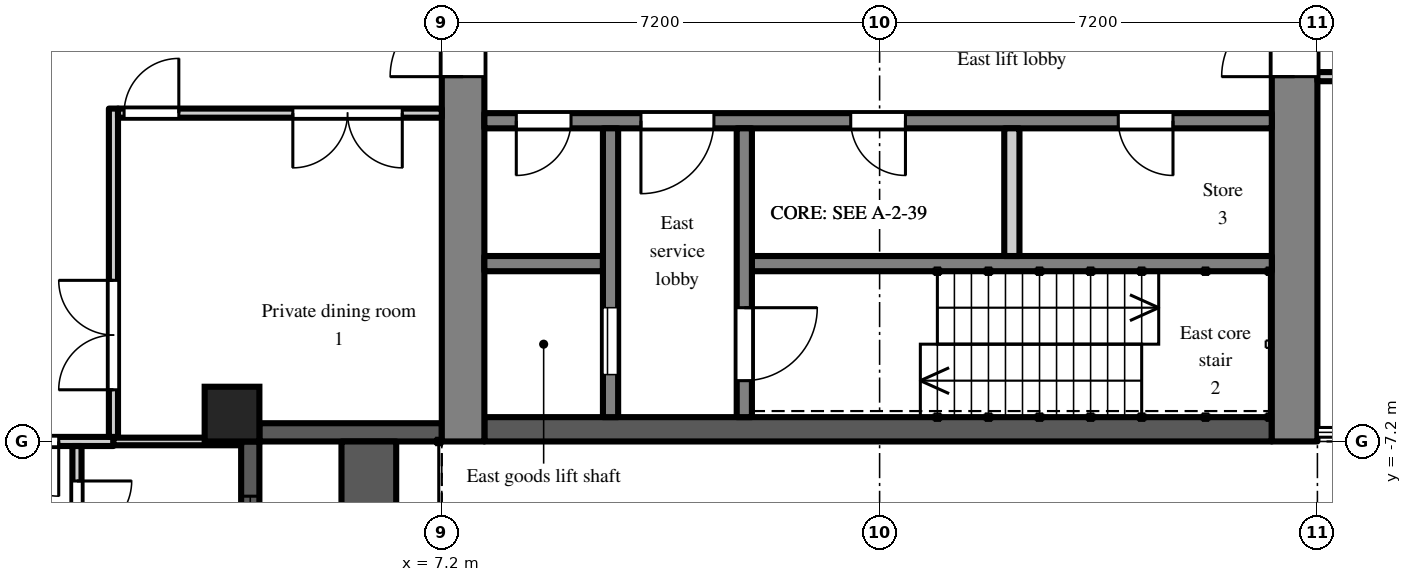
"""IFC4 building model, lengths in metres.
Left out: names, types, materials, properties, quantities, classifications, styles, units other than length and angle.
Written with IfcOpenShell. Run it as: python <this file> out.ifc"""

import sys

from ifc_helpers import new_model, si_unit, direction, frame, frame_2d, origin, origin_2d, place, context, subcontext, project, spatial, rectangle, extrude, element, fill, save


model = new_model("IFC4")
c1 = context("Model", 3, precision=1e-05, world=origin(), true_north=direction((0.0, 1.0)))
c2 = subcontext(c1, "Body", "Model", "MODEL_VIEW")
j1 = project(units=[si_unit("LENGTHUNIT", "METRE"), si_unit("PLANEANGLEUNIT", "RADIAN")], contexts=[c1])
p1 = place(None, origin())
s1 = spatial("IfcSite", under=j1, at=p1, CompositionType="ELEMENT")
p2 = place(p1, origin())
s2 = spatial("IfcBuilding", under=s1, at=p2, CompositionType="ELEMENT")
p3 = place(p2, frame((0.0, 0.0, 237.9)))
s3 = spatial("IfcBuildingStorey", under=s2, at=p3, CompositionType="ELEMENT", Elevation=237.9)
p4 = place(p3, frame((3.75, -6.75, 0.0), z_axis=(0.0, 0.0, 1.0), x_axis=(1.0, 0.0, 0.0)))
e1 = element("IfcColumn", 1, at=p4, inside=s3, PredefinedType="COLUMN", context=c2, shape_type="SweptSolid", body=[
    extrude(rectangle(XDim=0.9, YDim=0.9, at=origin_2d()), origin(), (0.0, 0.0, 1.0), 4.2),
])
p5 = place(p3, frame((4.05, -14.4, 0.0), z_axis=(0.0, 0.0, 1.0), x_axis=(0.0, 1.0, 0.0)))
e2 = element("IfcWall", 2, at=p5, inside=s3, PredefinedType="SOLIDWALL", context=c2, shape_type="SweptSolid", body=[
    extrude(rectangle(XDim=7.2, YDim=0.3, at=frame_2d((3.6, 0.0))), origin(), (0.0, 0.0, 1.0), 3.75),
])
p6 = place(p5, frame((3.0, 0.0, 0.0)))
e3 = element("IfcOpeningElement", 3, at=p6, cuts=e2, PredefinedType="OPENING", context=c2, shape_type="SweptSolid", body=[
    extrude(rectangle(XDim=1.2, YDim=2.05, at=frame_2d((0.6, 1.025))), frame((0.0, 0.16, 0.0), z_axis=(0.0, -1.0, 0.0), x_axis=(1.0, 0.0, 0.0)), (0.0, 0.0, 1.0), 0.32),
])
p7 = place(p5, frame((0.9, 0.0, 0.2)))
e4 = element("IfcOpeningElement", 4, at=p7, cuts=e2, PredefinedType="OPENING", context=c2, shape_type="SweptSolid", body=[
    extrude(rectangle(XDim=1.8, YDim=1.85, at=frame_2d((0.9, 0.925))), frame((0.0, 0.16, 0.0), z_axis=(0.0, -1.0, 0.0), x_axis=(1.0, 0.0, 0.0)), (0.0, 0.0, 1.0), 0.32),
])
p8 = place(p5, frame((4.5, 0.0, 0.2)))
e5 = element("IfcOpeningElement", 5, at=p8, cuts=e2, PredefinedType="OPENING", context=c2, shape_type="SweptSolid", body=[
    extrude(rectangle(XDim=1.8, YDim=1.85, at=frame_2d((0.9, 0.925))), frame((0.0, 0.16, 0.0), z_axis=(0.0, -1.0, 0.0), x_axis=(1.0, 0.0, 0.0)), (0.0, 0.0, 1.0), 0.32),
])
p9 = place(p3, frame((4.2, -7.05, 0.0), z_axis=(0.0, 0.0, 1.0), x_axis=(1.0, 0.0, 0.0)))
e6 = element("IfcWall", 6, at=p9, inside=s3, PredefinedType="SOLIDWALL", context=c2, shape_type="SweptSolid", body=[
    extrude(rectangle(XDim=3.0, YDim=0.3, at=frame_2d((1.5, 0.0))), origin(), (0.0, 0.0, 1.0), 3.75),
])
p10 = place(p3, frame((6.0, -14.4, 0.0), z_axis=(0.0, 0.0, 1.0), x_axis=(0.0, 1.0, 0.0)))
e7 = element("IfcWall", 7, at=p10, inside=s3, PredefinedType="PARAPET", context=c2, shape_type="SweptSolid", body=[
    extrude(rectangle(XDim=7.2, YDim=0.9, at=frame_2d((3.6, 0.0))), origin(), (0.0, 0.0, 1.0), 0.8),
])
p11 = place(p3, frame((7.55, -7.2, 0.0), z_axis=(0.0, 0.0, 1.0), x_axis=(0.0, 1.0, 0.0)))
e8 = element("IfcWall", 8, at=p11, inside=s3, PredefinedType="SHEAR", context=c2, shape_type="SweptSolid", body=[
    extrude(rectangle(XDim=14.4, YDim=0.7, at=frame_2d((7.2, 0.0))), origin(), (0.0, 0.0, 1.0), 3.75),
])
p12 = place(p11, frame((6.0, 0.0, 0.0)))
e9 = element("IfcOpeningElement", 9, at=p12, cuts=e8, PredefinedType="OPENING", context=c2, shape_type="SweptSolid", body=[
    extrude(rectangle(XDim=2.4, YDim=2.2, at=frame_2d((1.2, 1.1))), frame((0.0, 0.36, 0.0), z_axis=(0.0, -1.0, 0.0), x_axis=(1.0, 0.0, 0.0)), (0.0, 0.0, 1.0), 0.72),
])
p13 = place(p3, frame((21.225, -7.2, 0.0), z_axis=(0.0, 0.0, 1.0), x_axis=(0.0, 1.0, 0.0)))
e10 = element("IfcWall", 10, at=p13, inside=s3, PredefinedType="SHEAR", context=c2, shape_type="SweptSolid", body=[
    extrude(rectangle(XDim=14.4, YDim=0.75, at=frame_2d((7.2, 0.0))), origin(), (0.0, 0.0, 1.0), 3.75),
])
p14 = place(p13, frame((6.0, 0.0, 0.0)))
e11 = element("IfcOpeningElement", 11, at=p14, cuts=e10, PredefinedType="OPENING", context=c2, shape_type="SweptSolid", body=[
    extrude(rectangle(XDim=2.4, YDim=2.2, at=frame_2d((1.2, 1.1))), frame((0.0, 0.385, 0.0), z_axis=(0.0, -1.0, 0.0), x_axis=(1.0, 0.0, 0.0)), (0.0, 0.0, 1.0), 0.77),
])
p15 = place(p3, frame((7.9, -7.0, 0.0), z_axis=(0.0, 0.0, 1.0), x_axis=(1.0, 0.0, 0.0)))
e12 = element("IfcWall", 12, at=p15, inside=s3, PredefinedType="SHEAR", context=c2, shape_type="SweptSolid", body=[
    extrude(rectangle(XDim=12.95, YDim=0.4, at=frame_2d((6.475, 0.0))), origin(), (0.0, 0.0, 1.0), 3.75),
])
p16 = place(p3, frame((7.9, -1.925, 0.0), z_axis=(0.0, 0.0, 1.0), x_axis=(1.0, 0.0, 0.0)))
e13 = element("IfcWall", 13, at=p16, inside=s3, PredefinedType="SHEAR", context=c2, shape_type="SweptSolid", body=[
    extrude(rectangle(XDim=12.95, YDim=0.25, at=frame_2d((6.475, 0.0))), origin(), (0.0, 0.0, 1.0), 3.75),
])
p17 = place(p16, frame((0.525, 0.0, 0.0)))
e14 = element("IfcOpeningElement", 14, at=p17, cuts=e13, PredefinedType="OPENING", context=c2, shape_type="SweptSolid", body=[
    extrude(rectangle(XDim=0.9, YDim=2.1, at=frame_2d((0.45, 1.05))), frame((0.0, 0.135, 0.0), z_axis=(0.0, -1.0, 0.0), x_axis=(1.0, 0.0, 0.0)), (0.0, 0.0, 1.0), 0.27),
])
p18 = place(p16, frame((2.575, 0.0, 0.0)))
e15 = element("IfcOpeningElement", 15, at=p18, cuts=e13, PredefinedType="OPENING", context=c2, shape_type="SweptSolid", body=[
    extrude(rectangle(XDim=1.2, YDim=2.1, at=frame_2d((0.6, 1.05))), frame((0.0, 0.135, 0.0), z_axis=(0.0, -1.0, 0.0), x_axis=(1.0, 0.0, 0.0)), (0.0, 0.0, 1.0), 0.27),
])
p19 = place(p16, frame((6.025, 0.0, 0.0)))
e16 = element("IfcOpeningElement", 16, at=p19, cuts=e13, PredefinedType="OPENING", context=c2, shape_type="SweptSolid", body=[
    extrude(rectangle(XDim=0.9, YDim=2.1, at=frame_2d((0.45, 1.05))), frame((0.0, 0.135, 0.0), z_axis=(0.0, -1.0, 0.0), x_axis=(1.0, 0.0, 0.0)), (0.0, 0.0, 1.0), 0.27),
])
p20 = place(p16, frame((10.425, 0.0, 0.0)))
e17 = element("IfcOpeningElement", 17, at=p20, cuts=e13, PredefinedType="OPENING", context=c2, shape_type="SweptSolid", body=[
    extrude(rectangle(XDim=0.9, YDim=2.1, at=frame_2d((0.45, 1.05))), frame((0.0, 0.135, 0.0), z_axis=(0.0, -1.0, 0.0), x_axis=(1.0, 0.0, 0.0)), (0.0, 0.0, 1.0), 0.27),
])
p21 = place(p3, frame((7.9, -4.275, 0.0), z_axis=(0.0, 0.0, 1.0), x_axis=(1.0, 0.0, 0.0)))
e18 = element("IfcWall", 18, at=p21, inside=s3, PredefinedType="SHEAR", context=c2, shape_type="SweptSolid", body=[
    extrude(rectangle(XDim=1.95, YDim=0.25, at=frame_2d((0.975, 0.0))), origin(), (0.0, 0.0, 1.0), 3.75),
])
p22 = place(p3, frame((12.3, -4.275, 0.0), z_axis=(0.0, 0.0, 1.0), x_axis=(1.0, 0.0, 0.0)))
e19 = element("IfcWall", 19, at=p22, inside=s3, PredefinedType="SHEAR", context=c2, shape_type="SweptSolid", body=[
    extrude(rectangle(XDim=8.55, YDim=0.25, at=frame_2d((4.275, 0.0))), origin(), (0.0, 0.0, 1.0), 3.75),
])
p23 = place(p3, frame((9.975, -2.05, 0.0), z_axis=(0.0, 0.0, 1.0), x_axis=(0.0, -1.0, 0.0)))
e20 = element("IfcWall", 20, at=p23, inside=s3, PredefinedType="SHEAR", context=c2, shape_type="SweptSolid", body=[
    extrude(rectangle(XDim=4.75, YDim=0.25, at=frame_2d((2.375, 0.0))), origin(), (0.0, 0.0, 1.0), 3.75),
])
p24 = place(p23, frame((2.95, 0.0, 0.0)))
e21 = element("IfcOpeningElement", 21, at=p24, cuts=e20, PredefinedType="OPENING", context=c2, shape_type="SweptSolid", body=[
    extrude(rectangle(XDim=1.1, YDim=2.1, at=frame_2d((0.55, 1.05))), frame((0.0, 0.135, 0.0), z_axis=(0.0, -1.0, 0.0), x_axis=(1.0, 0.0, 0.0)), (0.0, 0.0, 1.0), 0.27),
])
p25 = place(p3, frame((12.175, -2.05, 0.0), z_axis=(0.0, 0.0, 1.0), x_axis=(0.0, -1.0, 0.0)))
e22 = element("IfcWall", 22, at=p25, inside=s3, PredefinedType="SHEAR", context=c2, shape_type="SweptSolid", body=[
    extrude(rectangle(XDim=4.75, YDim=0.25, at=frame_2d((2.375, 0.0))), origin(), (0.0, 0.0, 1.0), 3.75),
])
p26 = place(p25, frame((2.95, 0.0, 0.0)))
e23 = element("IfcOpeningElement", 23, at=p26, cuts=e22, PredefinedType="OPENING", context=c2, shape_type="SweptSolid", body=[
    extrude(rectangle(XDim=1.2, YDim=2.1, at=frame_2d((0.6, 1.05))), frame((0.0, 0.135, 0.0), z_axis=(0.0, -1.0, 0.0), x_axis=(1.0, 0.0, 0.0)), (0.0, 0.0, 1.0), 0.27),
])
p27 = place(p3, frame((16.575, -2.05, 0.0), z_axis=(0.0, 0.0, 1.0), x_axis=(0.0, -1.0, 0.0)))
e24 = element("IfcWall", 24, at=p27, inside=s3, PredefinedType="PARTITIONING", context=c2, shape_type="SweptSolid", body=[
    extrude(rectangle(XDim=2.1, YDim=0.25, at=frame_2d((1.05, 0.0))), origin(), (0.0, 0.0, 1.0), 3.75),
])
p28 = place(p3, frame((-3.9, -7.2, 0.0), z_axis=(0.0, 0.0, 1.0), x_axis=(1.0, 0.0, 0.0)))
e25 = element("IfcWall", 25, at=p28, inside=s3, PredefinedType="PARTITIONING", context=c2, shape_type="SweptSolid", body=[
    extrude(rectangle(XDim=5.7, YDim=0.15, at=frame_2d((2.85, 0.0))), origin(), (0.0, 0.0, 1.0), 3.75),
])
p29 = place(p28, frame((3.0, 0.0, 0.0)))
e26 = element("IfcOpeningElement", 26, at=p29, cuts=e25, PredefinedType="OPENING", context=c2, shape_type="SweptSolid", body=[
    extrude(rectangle(XDim=1.8, YDim=2.1, at=frame_2d((0.9, 1.05))), frame((0.0, 0.085, 0.0), z_axis=(0.0, -1.0, 0.0), x_axis=(1.0, 0.0, 0.0)), (0.0, 0.0, 1.0), 0.17),
])
p30 = place(p3, frame((1.2, -21.42, 0.0), z_axis=(0.0, 0.0, 1.0), x_axis=(0.0, 1.0, 0.0)))
e27 = element("IfcWall", 27, at=p30, inside=s3, PredefinedType="PARTITIONING", context=c2, shape_type="SweptSolid", body=[
    extrude(rectangle(XDim=14.145, YDim=0.15, at=frame_2d((7.073, 0.0))), origin(), (0.0, 0.0, 1.0), 3.75),
])
p31 = place(p30, frame((0.97, 0.0, 0.0)))
e28 = element("IfcOpeningElement", 28, at=p31, cuts=e27, PredefinedType="OPENING", context=c2, shape_type="SweptSolid", body=[
    extrude(rectangle(XDim=0.9, YDim=2.1, at=frame_2d((0.45, 1.05))), frame((0.0, 0.085, 0.0), z_axis=(0.0, -1.0, 0.0), x_axis=(1.0, 0.0, 0.0)), (0.0, 0.0, 1.0), 0.17),
])
p32 = place(p30, frame((2.77, 0.0, 0.0)))
e29 = element("IfcOpeningElement", 29, at=p32, cuts=e27, PredefinedType="OPENING", context=c2, shape_type="SweptSolid", body=[
    extrude(rectangle(XDim=0.9, YDim=2.1, at=frame_2d((0.45, 1.05))), frame((0.0, 0.085, 0.0), z_axis=(0.0, -1.0, 0.0), x_axis=(1.0, 0.0, 0.0)), (0.0, 0.0, 1.0), 0.17),
])
p33 = place(p30, frame((6.67, 0.0, 0.0)))
e30 = element("IfcOpeningElement", 30, at=p33, cuts=e27, PredefinedType="OPENING", context=c2, shape_type="SweptSolid", body=[
    extrude(rectangle(XDim=1.0, YDim=2.1, at=frame_2d((0.5, 1.05))), frame((0.0, 0.085, 0.0), z_axis=(0.0, -1.0, 0.0), x_axis=(1.0, 0.0, 0.0)), (0.0, 0.0, 1.0), 0.17),
])
p34 = place(p30, frame((12.67, 0.0, 0.0)))
e31 = element("IfcOpeningElement", 31, at=p34, cuts=e27, PredefinedType="OPENING", context=c2, shape_type="SweptSolid", body=[
    extrude(rectangle(XDim=0.9, YDim=2.1, at=frame_2d((0.45, 1.05))), frame((0.0, 0.085, 0.0), z_axis=(0.0, -1.0, 0.0), x_axis=(1.0, 0.0, 0.0)), (0.0, 0.0, 1.0), 0.17),
])
p35 = place(p3, frame((1.8, -7.125, 0.0), z_axis=(0.0, 0.0, 1.0), x_axis=(0.0, 1.0, 0.0)))
e32 = element("IfcWall", 32, at=p35, inside=s3, PredefinedType="PARTITIONING", context=c2, shape_type="SweptSolid", body=[
    extrude(rectangle(XDim=5.4, YDim=0.15, at=frame_2d((2.7, 0.0))), origin(), (0.0, 0.0, 1.0), 3.75),
])
p36 = place(p35, frame((0.775, 0.0, 0.0)))
e33 = element("IfcOpeningElement", 33, at=p36, cuts=e32, PredefinedType="OPENING", context=c2, shape_type="SweptSolid", body=[
    extrude(rectangle(XDim=1.8, YDim=2.1, at=frame_2d((0.9, 1.05))), frame((0.0, 0.085, 0.0), z_axis=(0.0, -1.0, 0.0), x_axis=(1.0, 0.0, 0.0)), (0.0, 0.0, 1.0), 0.17),
])
p37 = place(p3, frame((1.8, -7.2, 0.0), z_axis=(0.0, 0.0, 1.0), x_axis=(1.0, 0.0, 0.0)))
e34 = element("IfcWall", 34, at=p37, inside=s3, PredefinedType="PARTITIONING", context=c2, shape_type="SweptSolid", body=[
    extrude(rectangle(XDim=2.1, YDim=0.125, at=frame_2d((1.05, 0.0))), origin(), (0.0, 0.0, 1.0), 3.75),
])
p38 = place(p3, frame((1.875, -1.8, 0.0), z_axis=(0.0, 0.0, 1.0), x_axis=(1.0, 0.0, 0.0)))
e35 = element("IfcWall", 35, at=p38, inside=s3, PredefinedType="PARTITIONING", context=c2, shape_type="SweptSolid", body=[
    extrude(rectangle(XDim=5.325, YDim=0.15, at=frame_2d((2.663, 0.0))), origin(), (0.0, 0.0, 1.0), 3.75),
])
p39 = place(p38, frame((0.1, 0.0, 0.0)))
e36 = element("IfcOpeningElement", 36, at=p39, cuts=e35, PredefinedType="OPENING", context=c2, shape_type="SweptSolid", body=[
    extrude(rectangle(XDim=0.9, YDim=2.1, at=frame_2d((0.45, 1.05))), frame((0.0, 0.085, 0.0), z_axis=(0.0, -1.0, 0.0), x_axis=(1.0, 0.0, 0.0)), (0.0, 0.0, 1.0), 0.17),
])
p40 = place(p38, frame((2.875, 0.0, 0.0)))
e37 = element("IfcOpeningElement", 37, at=p40, cuts=e35, PredefinedType="OPENING", context=c2, shape_type="SweptSolid", body=[
    extrude(rectangle(XDim=1.8, YDim=2.1, at=frame_2d((0.9, 1.05))), frame((0.0, 0.085, 0.0), z_axis=(0.0, -1.0, 0.0), x_axis=(1.0, 0.0, 0.0)), (0.0, 0.0, 1.0), 0.17),
])
p41 = place(p3, frame((21.6, -1.2, 0.0), z_axis=(0.0, 0.0, 1.0), x_axis=(1.0, 0.0, 0.0)))
e38 = element("IfcWall", 38, at=p41, inside=s3, PredefinedType="PARTITIONING", context=c2, shape_type="SweptSolid", body=[
    extrude(rectangle(XDim=3.525, YDim=0.15, at=frame_2d((1.762, 0.0))), origin(), (0.0, 0.0, 1.0), 3.75),
])
p42 = place(p41, frame((1.35, 0.0, 0.0)))
e39 = element("IfcOpeningElement", 39, at=p42, cuts=e38, PredefinedType="OPENING", context=c2, shape_type="SweptSolid", body=[
    extrude(rectangle(XDim=0.9, YDim=2.1, at=frame_2d((0.45, 1.05))), frame((0.0, 0.085, 0.0), z_axis=(0.0, -1.0, 0.0), x_axis=(1.0, 0.0, 0.0)), (0.0, 0.0, 1.0), 0.17),
])
p43 = place(p8, origin())
e40 = element("IfcWindow", 40, at=p43, inside=s3, PartitioningType="SINGLE_PANEL", PredefinedType="WINDOW", context=c2, shape_type="SweptSolid", body=[
    extrude(rectangle(XDim=1.8, YDim=1.85, at=frame_2d((0.9, 0.925))), frame((0.0, 0.03, 0.0), z_axis=(0.0, -1.0, 0.0), x_axis=(1.0, 0.0, 0.0)), (0.0, 0.0, 1.0), 0.06),
])
fill(e5, e40)
p44 = place(p24, origin())
e41 = element("IfcDoor", 41, at=p44, inside=s3, OperationType="SLIDING_TO_LEFT", PredefinedType="DOOR", context=c2, shape_type="SweptSolid", body=[
    extrude(rectangle(XDim=1.1, YDim=2.1, at=frame_2d((0.55, 1.05))), frame((0.0, 0.025, 0.0), z_axis=(0.0, -1.0, 0.0), x_axis=(1.0, 0.0, 0.0)), (0.0, 0.0, 1.0), 0.05),
])
fill(e21, e41)
p45 = place(p26, origin())
e42 = element("IfcDoor", 42, at=p45, inside=s3, OperationType="SINGLE_SWING_LEFT", PredefinedType="DOOR", context=c2, shape_type="SweptSolid", body=[
    extrude(rectangle(XDim=1.2, YDim=2.1, at=frame_2d((0.6, 1.05))), frame((0.0, 0.025, 0.0), z_axis=(0.0, -1.0, 0.0), x_axis=(1.0, 0.0, 0.0)), (0.0, 0.0, 1.0), 0.05),
])
fill(e23, e42)
p46 = place(p17, frame((0.9, 0.0, 0.0), z_axis=(0.0, 0.0, 1.0), x_axis=(-1.0, 0.0, 0.0)))
e43 = element("IfcDoor", 43, at=p46, inside=s3, OperationType="SINGLE_SWING_RIGHT", PredefinedType="DOOR", context=c2, shape_type="SweptSolid", body=[
    extrude(rectangle(XDim=0.9, YDim=2.1, at=frame_2d((0.45, 1.05))), frame((0.0, 0.025, 0.0), z_axis=(0.0, -1.0, 0.0), x_axis=(1.0, 0.0, 0.0)), (0.0, 0.0, 1.0), 0.05),
])
fill(e14, e43)
p47 = place(p18, frame((1.2, 0.0, 0.0), z_axis=(0.0, 0.0, 1.0), x_axis=(-1.0, 0.0, 0.0)))
e44 = element("IfcDoor", 44, at=p47, inside=s3, OperationType="SINGLE_SWING_RIGHT", PredefinedType="DOOR", context=c2, shape_type="SweptSolid", body=[
    extrude(rectangle(XDim=1.2, YDim=2.1, at=frame_2d((0.6, 1.05))), frame((0.0, 0.025, 0.0), z_axis=(0.0, -1.0, 0.0), x_axis=(1.0, 0.0, 0.0)), (0.0, 0.0, 1.0), 0.05),
])
fill(e15, e44)
p48 = place(p12, origin())
e45 = element("IfcDoor", 45, at=p48, inside=s3, OperationType="DOUBLE_DOOR_DOUBLE_SWING", PredefinedType="DOOR", context=c2, shape_type="SweptSolid", body=[
    extrude(rectangle(XDim=2.4, YDim=2.2, at=frame_2d((1.2, 1.1))), frame((0.0, 0.025, 0.0), z_axis=(0.0, -1.0, 0.0), x_axis=(1.0, 0.0, 0.0)), (0.0, 0.0, 1.0), 0.05),
])
fill(e9, e45)
p49 = place(p14, origin())
e46 = element("IfcDoor", 46, at=p49, inside=s3, OperationType="DOUBLE_DOOR_DOUBLE_SWING", PredefinedType="DOOR", context=c2, shape_type="SweptSolid", body=[
    extrude(rectangle(XDim=2.4, YDim=2.2, at=frame_2d((1.2, 1.1))), frame((0.0, 0.025, 0.0), z_axis=(0.0, -1.0, 0.0), x_axis=(1.0, 0.0, 0.0)), (0.0, 0.0, 1.0), 0.05),
])
fill(e11, e46)
p50 = place(p19, frame((0.9, 0.0, 0.0), z_axis=(0.0, 0.0, 1.0), x_axis=(-1.0, 0.0, 0.0)))
e47 = element("IfcDoor", 47, at=p50, inside=s3, OperationType="SINGLE_SWING_LEFT", PredefinedType="DOOR", context=c2, shape_type="SweptSolid", body=[
    extrude(rectangle(XDim=0.9, YDim=2.1, at=frame_2d((0.45, 1.05))), frame((0.0, 0.025, 0.0), z_axis=(0.0, -1.0, 0.0), x_axis=(1.0, 0.0, 0.0)), (0.0, 0.0, 1.0), 0.05),
])
fill(e16, e47)
p51 = place(p20, frame((0.9, 0.0, 0.0), z_axis=(0.0, 0.0, 1.0), x_axis=(-1.0, 0.0, 0.0)))
e48 = element("IfcDoor", 48, at=p51, inside=s3, OperationType="SINGLE_SWING_LEFT", PredefinedType="DOOR", context=c2, shape_type="SweptSolid", body=[
    extrude(rectangle(XDim=0.9, YDim=2.1, at=frame_2d((0.45, 1.05))), frame((0.0, 0.025, 0.0), z_axis=(0.0, -1.0, 0.0), x_axis=(1.0, 0.0, 0.0)), (0.0, 0.0, 1.0), 0.05),
])
fill(e17, e48)
p52 = place(p36, origin())
e49 = element("IfcDoor", 49, at=p52, inside=s3, OperationType="DOUBLE_DOOR_DOUBLE_SWING", PredefinedType="DOOR", context=c2, shape_type="SweptSolid", body=[
    extrude(rectangle(XDim=1.8, YDim=2.1, at=frame_2d((0.9, 1.05))), frame((0.0, 0.025, 0.0), z_axis=(0.0, -1.0, 0.0), x_axis=(1.0, 0.0, 0.0)), (0.0, 0.0, 1.0), 0.05),
])
fill(e33, e49)
p53 = place(p39, origin())
e50 = element("IfcDoor", 50, at=p53, inside=s3, OperationType="SINGLE_SWING_RIGHT", PredefinedType="DOOR", context=c2, shape_type="SweptSolid", body=[
    extrude(rectangle(XDim=0.9, YDim=2.1, at=frame_2d((0.45, 1.05))), frame((0.0, 0.025, 0.0), z_axis=(0.0, -1.0, 0.0), x_axis=(1.0, 0.0, 0.0)), (0.0, 0.0, 1.0), 0.05),
])
fill(e36, e50)
p54 = place(p40, frame((1.8, 0.0, 0.0), z_axis=(0.0, 0.0, 1.0), x_axis=(-1.0, 0.0, 0.0)))
e51 = element("IfcDoor", 51, at=p54, inside=s3, OperationType="DOUBLE_DOOR_DOUBLE_SWING", PredefinedType="DOOR", context=c2, shape_type="SweptSolid", body=[
    extrude(rectangle(XDim=1.8, YDim=2.1, at=frame_2d((0.9, 1.05))), frame((0.0, 0.025, 0.0), z_axis=(0.0, -1.0, 0.0), x_axis=(1.0, 0.0, 0.0)), (0.0, 0.0, 1.0), 0.05),
])
fill(e37, e51)
p55 = place(p29, frame((1.8, 0.0, 0.0), z_axis=(0.0, 0.0, 1.0), x_axis=(-1.0, 0.0, 0.0)))
e52 = element("IfcDoor", 52, at=p55, inside=s3, OperationType="DOUBLE_DOOR_DOUBLE_SWING", PredefinedType="DOOR", context=c2, shape_type="SweptSolid", body=[
    extrude(rectangle(XDim=1.8, YDim=2.1, at=frame_2d((0.9, 1.05))), frame((0.0, 0.025, 0.0), z_axis=(0.0, -1.0, 0.0), x_axis=(1.0, 0.0, 0.0)), (0.0, 0.0, 1.0), 0.05),
])
fill(e26, e52)
p56 = place(p34, frame((0.9, 0.0, 0.0), z_axis=(0.0, 0.0, 1.0), x_axis=(-1.0, 0.0, 0.0)))
e53 = element("IfcDoor", 53, at=p56, inside=s3, OperationType="SINGLE_SWING_LEFT", PredefinedType="DOOR", context=c2, shape_type="SweptSolid", body=[
    extrude(rectangle(XDim=0.9, YDim=2.1, at=frame_2d((0.45, 1.05))), frame((0.0, 0.025, 0.0), z_axis=(0.0, -1.0, 0.0), x_axis=(1.0, 0.0, 0.0)), (0.0, 0.0, 1.0), 0.05),
])
fill(e31, e53)
save(model, sys.argv[1])
